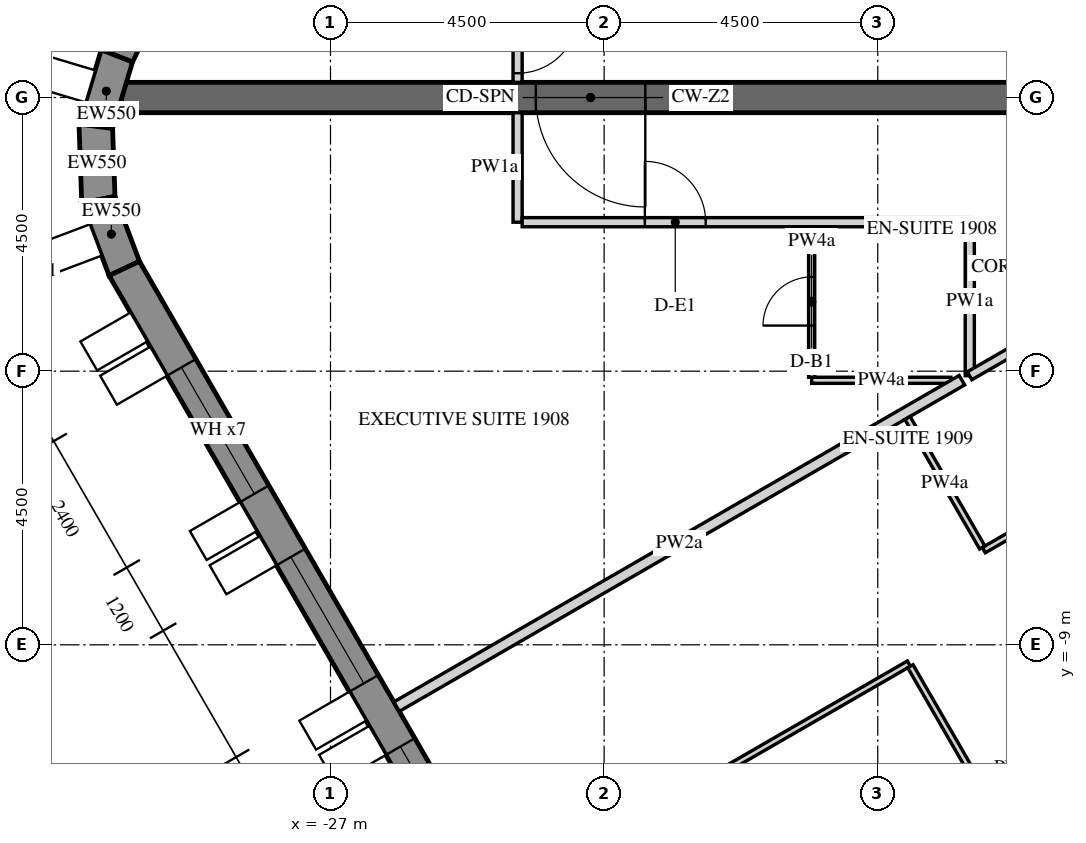
"""IFC4 building model, lengths in metres.
Left out: names, types, materials, properties, quantities, classifications, styles, units other than length and angle.
Written with IfcOpenShell. Run it as: python <this file> out.ifc"""

import sys

from ifc_helpers import new_model, si_unit, direction, frame, frame_2d, origin, place, context, subcontext, project, spatial, polyline, rectangle, outline, extrude, element, fill, save


model = new_model("IFC4")
c1 = context("Model", 3, precision=1e-05, world=origin(), true_north=direction((0.0, 1.0)))
c2 = subcontext(c1, "Body", "Model", "MODEL_VIEW")
j1 = project(units=[si_unit("LENGTHUNIT", "METRE"), si_unit("PLANEANGLEUNIT", "RADIAN")], contexts=[c1])
p1 = place(None, origin())
s1 = spatial("IfcSite", under=j1, at=p1, CompositionType="ELEMENT")
p2 = place(p1, origin())
s2 = spatial("IfcBuilding", under=s1, at=p2, CompositionType="ELEMENT")
p3 = place(p2, frame((0.0, 0.0, 238.5)))
s3 = spatial("IfcBuildingStorey", under=s2, at=p3, CompositionType="ELEMENT", Elevation=238.5)
p4 = place(p3, frame((-18.345, 25.633, -0.15), z_axis=(0.0, 0.0, 1.0), x_axis=(-0.43837181828, -0.898793718791, 0.0)))
e1 = element("IfcWall", 1, at=p4, inside=s3, PredefinedType="SOLIDWALL", context=c2, shape_type="SweptSolid", body=[
    extrude(outline(polyline([(-0.026, -0.275), (27.78, -0.275), (27.735, 0.275), (0.026, 0.275), (-0.026, -0.275)])), origin(), (0.0, 0.0, 1.0), 3.9),
])
p5 = place(p4, frame((1.879, 0.0, 1.05)))
e2 = element("IfcOpeningElement", 2, at=p5, cuts=e1, PredefinedType="OPENING", context=c2, shape_type="SweptSolid", body=[
    extrude(rectangle(XDim=2.4, YDim=2.4, at=frame_2d((1.2, 1.2))), frame((0.0, 0.285, 0.0), z_axis=(0.0, -1.0, 0.0), x_axis=(1.0, 0.0, 0.0)), (0.0, 0.0, 1.0), 0.57),
])
p6 = place(p4, frame((5.479, 0.0, 1.05)))
e3 = element("IfcOpeningElement", 3, at=p6, cuts=e1, PredefinedType="OPENING", context=c2, shape_type="SweptSolid", body=[
    extrude(rectangle(XDim=2.4, YDim=2.4, at=frame_2d((1.2, 1.2))), frame((0.0, 0.285, 0.0), z_axis=(0.0, -1.0, 0.0), x_axis=(1.0, 0.0, 0.0)), (0.0, 0.0, 1.0), 0.57),
])
p7 = place(p4, frame((9.079, 0.0, 1.05)))
e4 = element("IfcOpeningElement", 4, at=p7, cuts=e1, PredefinedType="OPENING", context=c2, shape_type="SweptSolid", body=[
    extrude(rectangle(XDim=2.4, YDim=2.4, at=frame_2d((1.2, 1.2))), frame((0.0, 0.285, 0.0), z_axis=(0.0, -1.0, 0.0), x_axis=(1.0, 0.0, 0.0)), (0.0, 0.0, 1.0), 0.57),
])
p8 = place(p4, frame((12.679, 0.0, 1.05)))
e5 = element("IfcOpeningElement", 5, at=p8, cuts=e1, PredefinedType="OPENING", context=c2, shape_type="SweptSolid", body=[
    extrude(rectangle(XDim=2.4, YDim=2.4, at=frame_2d((1.2, 1.2))), frame((0.0, 0.285, 0.0), z_axis=(0.0, -1.0, 0.0), x_axis=(1.0, 0.0, 0.0)), (0.0, 0.0, 1.0), 0.57),
])
p9 = place(p4, frame((16.279, 0.0, 1.05)))
e6 = element("IfcOpeningElement", 6, at=p9, cuts=e1, PredefinedType="OPENING", context=c2, shape_type="SweptSolid", body=[
    extrude(rectangle(XDim=2.4, YDim=2.4, at=frame_2d((1.2, 1.2))), frame((0.0, 0.285, 0.0), z_axis=(0.0, -1.0, 0.0), x_axis=(1.0, 0.0, 0.0)), (0.0, 0.0, 1.0), 0.57),
])
p10 = place(p4, frame((19.879, 0.0, 1.05)))
e7 = element("IfcOpeningElement", 7, at=p10, cuts=e1, PredefinedType="OPENING", context=c2, shape_type="SweptSolid", body=[
    extrude(rectangle(XDim=2.4, YDim=2.4, at=frame_2d((1.2, 1.2))), frame((0.0, 0.285, 0.0), z_axis=(0.0, -1.0, 0.0), x_axis=(1.0, 0.0, 0.0)), (0.0, 0.0, 1.0), 0.57),
])
p11 = place(p4, frame((23.479, 0.0, 1.05)))
e8 = element("IfcOpeningElement", 8, at=p11, cuts=e1, PredefinedType="OPENING", context=c2, shape_type="SweptSolid", body=[
    extrude(rectangle(XDim=2.4, YDim=2.4, at=frame_2d((1.2, 1.2))), frame((0.0, 0.285, 0.0), z_axis=(0.0, -1.0, 0.0), x_axis=(1.0, 0.0, 0.0)), (0.0, 0.0, 1.0), 0.57),
])
p12 = place(p3, frame((-30.513, 0.684, -0.15), z_axis=(0.0, 0.0, 1.0), x_axis=(-0.286736058109, -0.958009620505, 0.0)))
e9 = element("IfcWall", 9, at=p12, inside=s3, PredefinedType="SOLIDWALL", context=c2, shape_type="SweptSolid", body=[
    extrude(outline(polyline([(-0.022, -0.275), (1.253, -0.275), (1.163, 0.275), (0.022, 0.275), (-0.022, -0.275)])), origin(), (0.0, 0.0, 1.0), 3.9),
])
p13 = place(p3, frame((-30.86, -0.473, -0.15), z_axis=(0.0, 0.0, 1.0), x_axis=(0.03495638276, -0.999388838893, 0.0)))
e10 = element("IfcWall", 10, at=p13, inside=s3, PredefinedType="SOLIDWALL", context=c2, shape_type="SweptSolid", body=[
    extrude(outline(polyline([(-0.045, -0.275), (1.253, -0.275), (1.163, 0.275), (0.045, 0.275), (-0.045, -0.275)])), origin(), (0.0, 0.0, 1.0), 3.9),
])
p14 = place(p3, frame((-30.817, -1.681, -0.15), z_axis=(0.0, 0.0, 1.0), x_axis=(0.352850303963, -0.935679786569, 0.0)))
e11 = element("IfcWall", 11, at=p14, inside=s3, PredefinedType="SOLIDWALL", context=c2, shape_type="SweptSolid", body=[
    extrude(outline(polyline([(-0.045, -0.275), (1.23, -0.275), (1.186, 0.275), (0.045, 0.275), (-0.045, -0.275)])), origin(), (0.0, 0.0, 1.0), 3.9),
])
p15 = place(p3, frame((-30.391, -2.811, -0.15), z_axis=(0.0, 0.0, 1.0), x_axis=(0.499998569178, -0.866026229868, 0.0)))
e12 = element("IfcWall", 12, at=p15, inside=s3, PredefinedType="SOLIDWALL", context=c2, shape_type="SweptSolid", body=[
    extrude(outline(polyline([(-0.022, -0.275), (27.783, -0.275), (27.732, 0.275), (0.022, 0.275), (-0.022, -0.275)])), origin(), (0.0, 0.0, 1.0), 3.9),
])
p16 = place(p15, frame((1.879, 0.0, 1.05)))
e13 = element("IfcOpeningElement", 13, at=p16, cuts=e12, PredefinedType="OPENING", context=c2, shape_type="SweptSolid", body=[
    extrude(rectangle(XDim=2.4, YDim=2.4, at=frame_2d((1.2, 1.2))), frame((0.0, 0.285, 0.0), z_axis=(0.0, -1.0, 0.0), x_axis=(1.0, 0.0, 0.0)), (0.0, 0.0, 1.0), 0.57),
])
p17 = place(p15, frame((5.479, 0.0, 1.05)))
e14 = element("IfcOpeningElement", 14, at=p17, cuts=e12, PredefinedType="OPENING", context=c2, shape_type="SweptSolid", body=[
    extrude(rectangle(XDim=2.4, YDim=2.4, at=frame_2d((1.2, 1.2))), frame((0.0, 0.285, 0.0), z_axis=(0.0, -1.0, 0.0), x_axis=(1.0, 0.0, 0.0)), (0.0, 0.0, 1.0), 0.57),
])
p18 = place(p15, frame((9.079, 0.0, 1.05)))
e15 = element("IfcOpeningElement", 15, at=p18, cuts=e12, PredefinedType="OPENING", context=c2, shape_type="SweptSolid", body=[
    extrude(rectangle(XDim=2.4, YDim=2.4, at=frame_2d((1.2, 1.2))), frame((0.0, 0.285, 0.0), z_axis=(0.0, -1.0, 0.0), x_axis=(1.0, 0.0, 0.0)), (0.0, 0.0, 1.0), 0.57),
])
p19 = place(p15, frame((12.679, 0.0, 1.05)))
e16 = element("IfcOpeningElement", 16, at=p19, cuts=e12, PredefinedType="OPENING", context=c2, shape_type="SweptSolid", body=[
    extrude(rectangle(XDim=2.4, YDim=2.4, at=frame_2d((1.2, 1.2))), frame((0.0, 0.285, 0.0), z_axis=(0.0, -1.0, 0.0), x_axis=(1.0, 0.0, 0.0)), (0.0, 0.0, 1.0), 0.57),
])
p20 = place(p15, frame((16.279, 0.0, 1.05)))
e17 = element("IfcOpeningElement", 17, at=p20, cuts=e12, PredefinedType="OPENING", context=c2, shape_type="SweptSolid", body=[
    extrude(rectangle(XDim=2.4, YDim=2.4, at=frame_2d((1.2, 1.2))), frame((0.0, 0.285, 0.0), z_axis=(0.0, -1.0, 0.0), x_axis=(1.0, 0.0, 0.0)), (0.0, 0.0, 1.0), 0.57),
])
p21 = place(p15, frame((19.879, 0.0, 1.05)))
e18 = element("IfcOpeningElement", 18, at=p21, cuts=e12, PredefinedType="OPENING", context=c2, shape_type="SweptSolid", body=[
    extrude(rectangle(XDim=2.4, YDim=2.4, at=frame_2d((1.2, 1.2))), frame((0.0, 0.285, 0.0), z_axis=(0.0, -1.0, 0.0), x_axis=(1.0, 0.0, 0.0)), (0.0, 0.0, 1.0), 0.57),
])
p22 = place(p15, frame((23.479, 0.0, 1.05)))
e19 = element("IfcOpeningElement", 19, at=p22, cuts=e12, PredefinedType="OPENING", context=c2, shape_type="SweptSolid", body=[
    extrude(rectangle(XDim=2.4, YDim=2.4, at=frame_2d((1.2, 1.2))), frame((0.0, 0.285, 0.0), z_axis=(0.0, -1.0, 0.0), x_axis=(1.0, 0.0, 0.0)), (0.0, 0.0, 1.0), 0.57),
])
p23 = place(p3, frame((-15.011, 0.0, -0.15), z_axis=(0.0, 0.0, 1.0), x_axis=(-1.0, 0.0, 0.0)))
e20 = element("IfcWall", 20, at=p23, inside=s3, PredefinedType="SHEAR", context=c2, shape_type="SweptSolid", body=[
    extrude(rectangle(XDim=15.424, YDim=0.5, at=frame_2d((7.712, 0.0))), origin(), (0.0, 0.0, 1.0), 3.9),
])
p24 = place(p23, frame((6.812, 0.0, 0.15)))
e21 = element("IfcOpeningElement", 21, at=p24, cuts=e20, PredefinedType="OPENING", context=c2, shape_type="SweptSolid", body=[
    extrude(rectangle(XDim=1.8, YDim=2.4, at=frame_2d((0.9, 1.2))), frame((0.0, 0.26, 0.0), z_axis=(0.0, -1.0, 0.0), x_axis=(1.0, 0.0, 0.0)), (0.0, 0.0, 1.0), 0.52),
])
p25 = place(p3, frame((-23.923, 1.975, 0.0), z_axis=(0.0, 0.0, 1.0), x_axis=(0.0, -1.0, 0.0)))
e22 = element("IfcWall", 22, at=p25, inside=s3, PredefinedType="PARTITIONING", context=c2, shape_type="SweptSolid", body=[
    extrude(rectangle(XDim=1.725, YDim=0.15, at=frame_2d((0.863, 0.0))), origin(), (0.0, 0.0, 1.0), 2.838),
])
p26 = place(p25, frame((0.575, 0.0, 0.0)))
e23 = element("IfcOpeningElement", 23, at=p26, cuts=e22, PredefinedType="OPENING", context=c2, shape_type="SweptSolid", body=[
    extrude(rectangle(XDim=1.0, YDim=2.1, at=frame_2d((0.5, 1.05))), frame((0.0, 0.085, 0.0), z_axis=(0.0, -1.0, 0.0), x_axis=(1.0, 0.0, 0.0)), (0.0, 0.0, 1.0), 0.17),
])
p27 = place(p3, frame((-23.923, -0.25, 0.0), z_axis=(0.0, 0.0, 1.0), x_axis=(0.0, -1.0, 0.0)))
e24 = element("IfcWall", 24, at=p27, inside=s3, PredefinedType="PARTITIONING", context=c2, shape_type="SweptSolid", body=[
    extrude(rectangle(XDim=1.8, YDim=0.15, at=frame_2d((0.9, 0.0))), origin(), (0.0, 0.0, 1.0), 2.838),
])
p28 = place(p3, frame((-23.848, -2.05, 0.0), z_axis=(0.0, 0.0, 1.0), x_axis=(1.0, 0.0, 0.0)))
e25 = element("IfcWall", 25, at=p28, inside=s3, PredefinedType="PARTITIONING", context=c2, shape_type="SweptSolid", body=[
    extrude(rectangle(XDim=7.361, YDim=0.15, at=frame_2d((3.68, 0.0))), origin(), (0.0, 0.0, 1.0), 2.838),
])
p29 = place(p28, frame((2.018, 0.0, 0.0)))
e26 = element("IfcOpeningElement", 26, at=p29, cuts=e25, PredefinedType="OPENING", context=c2, shape_type="SweptSolid", body=[
    extrude(rectangle(XDim=1.0, YDim=2.1, at=frame_2d((0.5, 1.05))), frame((0.0, 0.085, 0.0), z_axis=(0.0, -1.0, 0.0), x_axis=(1.0, 0.0, 0.0)), (0.0, 0.0, 1.0), 0.17),
])
p30 = place(p3, frame((-16.487, -2.125, 0.0), z_axis=(0.0, 0.0, 1.0), x_axis=(0.0, -1.0, 0.0)))
e27 = element("IfcWall", 27, at=p30, inside=s3, PredefinedType="PARTITIONING", context=c2, shape_type="SweptSolid", body=[
    extrude(rectangle(XDim=2.449, YDim=0.15, at=frame_2d((1.225, 0.0))), origin(), (0.0, 0.0, 1.0), 2.838),
])
p31 = place(p3, frame((-16.49, -4.576, 0.0), z_axis=(0.0, 0.0, 1.0), x_axis=(0.865993845424, 0.5000546567, 0.0)))
e28 = element("IfcWall", 28, at=p31, inside=s3, PredefinedType="PARTITIONING", context=c2, shape_type="SweptSolid", body=[
    extrude(rectangle(XDim=1.569, YDim=0.15, at=frame_2d((0.785, 0.0))), origin(), (0.0, 0.0, 1.0), 2.838),
])
p32 = place(p3, frame((-16.798, -4.65, 0.0), z_axis=(0.0, 0.0, 1.0), x_axis=(-1.0, 0.0, 0.0)))
e29 = element("IfcWall", 29, at=p32, inside=s3, PredefinedType="PARTITIONING", context=c2, shape_type="SweptSolid", body=[
    extrude(rectangle(XDim=2.289, YDim=0.1, at=frame_2d((1.144, 0.0))), origin(), (0.0, 0.0, 1.0), 2.838),
])
p33 = place(p3, frame((-19.087, -4.6, 0.0), z_axis=(0.0, 0.0, 1.0), x_axis=(0.0, 1.0, 0.0)))
e30 = element("IfcWall", 30, at=p33, inside=s3, PredefinedType="PARTITIONING", context=c2, shape_type="SweptSolid", body=[
    extrude(rectangle(XDim=2.475, YDim=0.1, at=frame_2d((1.238, 0.0))), origin(), (0.0, 0.0, 1.0), 2.838),
])
p34 = place(p33, frame((0.85, 0.0, 0.0)))
e31 = element("IfcOpeningElement", 31, at=p34, cuts=e30, PredefinedType="OPENING", context=c2, shape_type="SweptSolid", body=[
    extrude(rectangle(XDim=0.8, YDim=2.1, at=frame_2d((0.4, 1.05))), frame((0.0, 0.06, 0.0), z_axis=(0.0, -1.0, 0.0), x_axis=(1.0, 0.0, 0.0)), (0.0, 0.0, 1.0), 0.12),
])
p35 = place(p3, frame((-25.914, -10.017, 0.0), z_axis=(0.0, 0.0, 1.0), x_axis=(0.86602614826, 0.499998710529, 0.0)))
e32 = element("IfcWall", 32, at=p35, inside=s3, PredefinedType="PARTITIONING", context=c2, shape_type="SweptSolid", body=[
    extrude(rectangle(XDim=10.735, YDim=0.18, at=frame_2d((5.368, 0.0))), origin(), (0.0, 0.0, 1.0), 2.838),
])
p36 = place(p3, frame((-13.896, -6.081, 0.0), z_axis=(0.0, 0.0, 1.0), x_axis=(-0.866012511928, -0.500022328685, 0.0)))
e33 = element("IfcWall", 33, at=p36, inside=s3, PredefinedType="PARTITIONING", context=c2, shape_type="SweptSolid", body=[
    extrude(rectangle(XDim=2.725, YDim=0.1, at=frame_2d((1.363, 0.0))), origin(), (0.0, 0.0, 1.0), 2.838),
])
p37 = place(p36, frame((0.925, 0.0, 0.0)))
e34 = element("IfcOpeningElement", 34, at=p37, cuts=e33, PredefinedType="OPENING", context=c2, shape_type="SweptSolid", body=[
    extrude(rectangle(XDim=0.8, YDim=2.1, at=frame_2d((0.4, 1.05))), frame((0.0, 0.06, 0.0), z_axis=(0.0, -1.0, 0.0), x_axis=(1.0, 0.0, 0.0)), (0.0, 0.0, 1.0), 0.12),
])
p38 = place(p3, frame((-16.281, -7.4, 0.0), z_axis=(0.0, 0.0, 1.0), x_axis=(-0.500003092839, 0.866023618125, 0.0)))
e35 = element("IfcWall", 35, at=p38, inside=s3, PredefinedType="PARTITIONING", context=c2, shape_type="SweptSolid", body=[
    extrude(rectangle(XDim=2.46, YDim=0.1, at=frame_2d((1.23, 0.0))), origin(), (0.0, 0.0, 1.0), 2.838),
])
p39 = place(p3, frame((-24.114, -13.134, 0.0), z_axis=(0.0, 0.0, 1.0), x_axis=(0.866033062874, 0.499986733834, 0.0)))
e36 = element("IfcWall", 36, at=p39, inside=s3, PredefinedType="PARTITIONING", context=c2, shape_type="SweptSolid", body=[
    extrude(rectangle(XDim=7.65, YDim=0.1, at=frame_2d((3.825, 0.0))), origin(), (0.0, 0.0, 1.0), 2.838),
])
p40 = place(p3, frame((-17.463, -9.353, 0.0), z_axis=(0.0, 0.0, 1.0), x_axis=(0.499995846692, -0.866027801685, 0.0)))
e37 = element("IfcWall", 37, at=p40, inside=s3, PredefinedType="PARTITIONING", context=c2, shape_type="SweptSolid", body=[
    extrude(rectangle(XDim=7.06, YDim=0.1, at=frame_2d((3.53, 0.0))), origin(), (0.0, 0.0, 1.0), 2.838),
])
p41 = place(p40, frame((3.1, 0.0, 0.0)))
e38 = element("IfcOpeningElement", 38, at=p41, cuts=e37, PredefinedType="OPENING", context=c2, shape_type="SweptSolid", body=[
    extrude(rectangle(XDim=0.9, YDim=2.1, at=frame_2d((0.45, 1.05))), frame((0.0, 0.06, 0.0), z_axis=(0.0, -1.0, 0.0), x_axis=(1.0, 0.0, 0.0)), (0.0, 0.0, 1.0), 0.12),
])
p42 = place(p16, frame((0.0, 0.205, 0.0)))
e39 = element("IfcWindow", 39, at=p42, inside=s3, PartitioningType="DOUBLE_PANEL_VERTICAL", PredefinedType="WINDOW", context=c2, shape_type="SweptSolid", body=[
    extrude(rectangle(XDim=2.4, YDim=2.4, at=frame_2d((1.2, 1.2))), frame((0.0, 0.03, 0.0), z_axis=(0.0, -1.0, 0.0), x_axis=(1.0, 0.0, 0.0)), (0.0, 0.0, 1.0), 0.06),
])
fill(e13, e39)
p43 = place(p17, frame((0.0, 0.205, 0.0)))
e40 = element("IfcWindow", 40, at=p43, inside=s3, PartitioningType="DOUBLE_PANEL_VERTICAL", PredefinedType="WINDOW", context=c2, shape_type="SweptSolid", body=[
    extrude(rectangle(XDim=2.4, YDim=2.4, at=frame_2d((1.2, 1.2))), frame((0.0, 0.03, 0.0), z_axis=(0.0, -1.0, 0.0), x_axis=(1.0, 0.0, 0.0)), (0.0, 0.0, 1.0), 0.06),
])
fill(e14, e40)
p44 = place(p18, frame((0.0, 0.205, 0.0)))
e41 = element("IfcWindow", 41, at=p44, inside=s3, PartitioningType="DOUBLE_PANEL_VERTICAL", PredefinedType="WINDOW", context=c2, shape_type="SweptSolid", body=[
    extrude(rectangle(XDim=2.4, YDim=2.4, at=frame_2d((1.2, 1.2))), frame((0.0, 0.03, 0.0), z_axis=(0.0, -1.0, 0.0), x_axis=(1.0, 0.0, 0.0)), (0.0, 0.0, 1.0), 0.06),
])
fill(e15, e41)
p45 = place(p24, origin())
e42 = element("IfcDoor", 42, at=p45, inside=s3, OperationType="DOUBLE_DOOR_SINGLE_SWING", PredefinedType="DOOR", context=c2, shape_type="SweptSolid", body=[
    extrude(rectangle(XDim=1.8, YDim=2.4, at=frame_2d((0.9, 1.2))), frame((0.0, 0.025, 0.0), z_axis=(0.0, -1.0, 0.0), x_axis=(1.0, 0.0, 0.0)), (0.0, 0.0, 1.0), 0.05),
])
fill(e21, e42)
p46 = place(p26, origin())
e43 = element("IfcDoor", 43, at=p46, inside=s3, OperationType="SINGLE_SWING_LEFT", PredefinedType="DOOR", context=c2, shape_type="SweptSolid", body=[
    extrude(rectangle(XDim=1.0, YDim=2.1, at=frame_2d((0.5, 1.05))), frame((0.0, 0.025, 0.0), z_axis=(0.0, -1.0, 0.0), x_axis=(1.0, 0.0, 0.0)), (0.0, 0.0, 1.0), 0.05),
])
fill(e23, e43)
p47 = place(p29, origin())
e44 = element("IfcDoor", 44, at=p47, inside=s3, OperationType="SINGLE_SWING_LEFT", PredefinedType="DOOR", context=c2, shape_type="SweptSolid", body=[
    extrude(rectangle(XDim=1.0, YDim=2.1, at=frame_2d((0.5, 1.05))), frame((0.0, 0.025, 0.0), z_axis=(0.0, -1.0, 0.0), x_axis=(1.0, 0.0, 0.0)), (0.0, 0.0, 1.0), 0.05),
])
fill(e26, e44)
p48 = place(p34, origin())
e45 = element("IfcDoor", 45, at=p48, inside=s3, OperationType="SINGLE_SWING_RIGHT", PredefinedType="DOOR", context=c2, shape_type="SweptSolid", body=[
    extrude(rectangle(XDim=0.8, YDim=2.1, at=frame_2d((0.4, 1.05))), frame((0.0, 0.025, 0.0), z_axis=(0.0, -1.0, 0.0), x_axis=(1.0, 0.0, 0.0)), (0.0, 0.0, 1.0), 0.05),
])
fill(e31, e45)
save(model, sys.argv[1])
